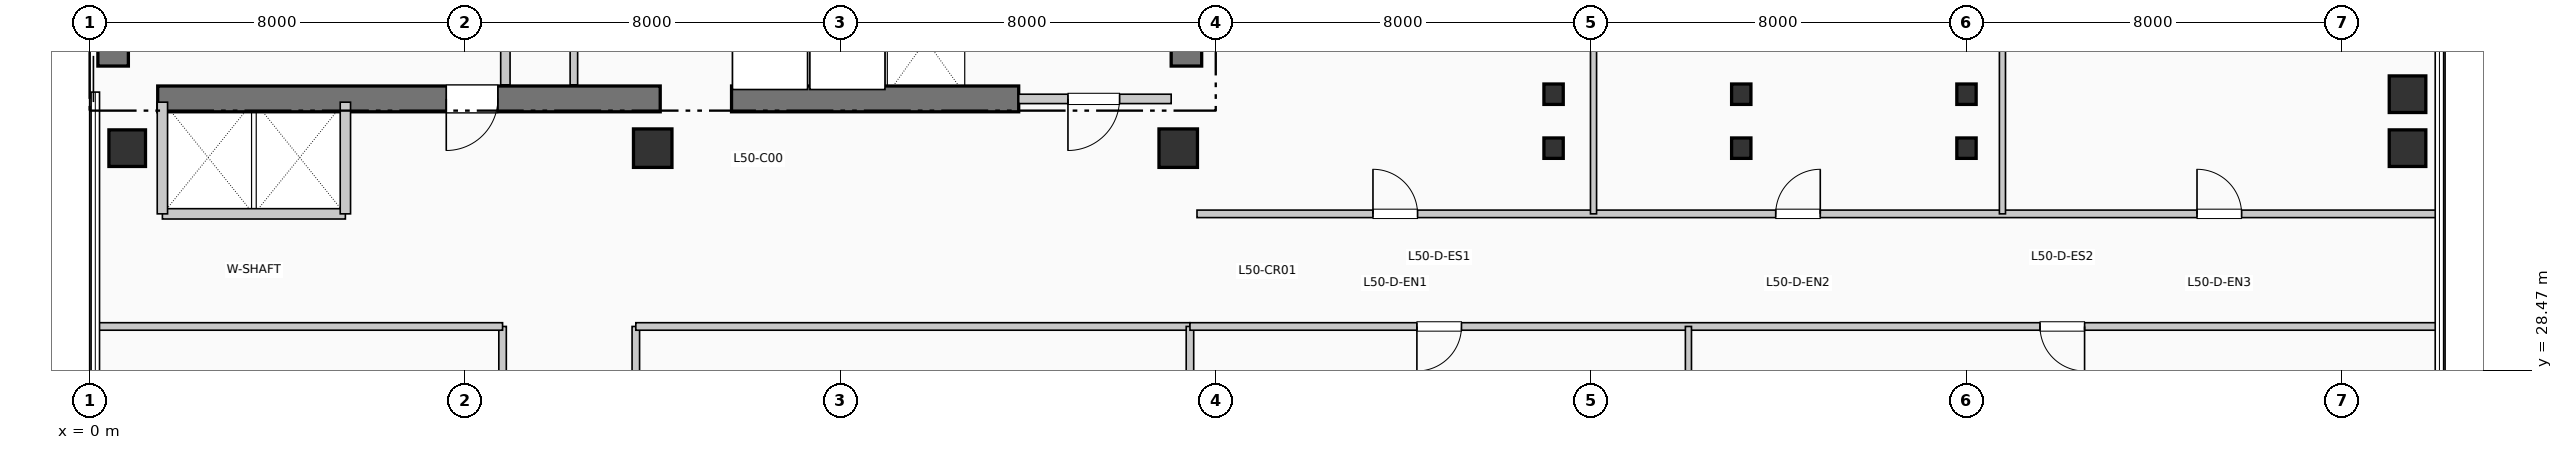
"""IFC4 building model, lengths in metres.
Left out: names, types, materials, properties, quantities, classifications, styles, units other than length and angle.
Written with IfcOpenShell. Run it as: python <this file> out.ifc"""

import sys

from ifc_helpers import new_model, si_unit, direction, frame, frame_2d, origin, origin_2d, place, context, subcontext, project, spatial, rectangle, i_section, extrude, element, fill, save


model = new_model("IFC4")
c1 = context("Model", 3, precision=1e-05, world=origin(), true_north=direction((0.0, 1.0)))
c2 = subcontext(c1, "Body", "Model", "MODEL_VIEW")
j1 = project(units=[si_unit("LENGTHUNIT", "METRE"), si_unit("PLANEANGLEUNIT", "RADIAN")], contexts=[c1])
p1 = place(None, origin())
s1 = spatial("IfcSite", under=j1, at=p1, CompositionType="ELEMENT")
p2 = place(p1, origin())
s2 = spatial("IfcBuilding", under=s1, at=p2, CompositionType="ELEMENT")
p3 = place(p2, frame((0.0, 0.0, 207.24)))
s3 = spatial("IfcBuildingStorey", under=s2, at=p3, CompositionType="ELEMENT", Elevation=207.24)
p4 = place(p3, frame((0.5, 34.95, 0.0), z_axis=(0.0, 0.0, 1.0), x_axis=(0.0, 1.0, 0.0)))
e1 = element("IfcWall", 1, at=p4, inside=s3, PredefinedType="SHEAR", context=c2, shape_type="SweptSolid", body=[
    extrude(rectangle(XDim=7.9, YDim=0.65, at=frame_2d((3.95, 0.0))), origin(), (0.0, 0.0, 1.0), 3.96),
])
p5 = place(p3, frame((23.375, 34.95, 0.0), z_axis=(0.0, 0.0, 1.0), x_axis=(0.0, 1.0, 0.0)))
e2 = element("IfcWall", 2, at=p5, inside=s3, PredefinedType="SHEAR", context=c2, shape_type="SweptSolid", body=[
    extrude(rectangle(XDim=10.64, YDim=0.65, at=frame_2d((5.32, 0.0))), origin(), (0.0, 0.0, 1.0), 3.96),
])
p6 = place(p3, frame((1.45, 34.25, 0.0), z_axis=(0.0, 0.0, 1.0), x_axis=(1.0, 0.0, 0.0)))
e3 = element("IfcWall", 3, at=p6, inside=s3, PredefinedType="SHEAR", context=c2, shape_type="SweptSolid", body=[
    extrude(rectangle(XDim=10.71, YDim=0.55, at=frame_2d((5.355, 0.0))), origin(), (0.0, 0.0, 1.0), 3.96),
])
p7 = place(p6, frame((7.25, 0.0, 0.0), z_axis=(0.0, 0.0, 1.0), x_axis=(-1.0, 0.0, 0.0)))
e4 = element("IfcOpeningElement", 4, at=p7, cuts=e3, PredefinedType="OPENING", context=c2, shape_type="SweptSolid", body=[
    extrude(rectangle(XDim=1.1, YDim=2.15, at=frame_2d((0.55, 1.075))), frame((0.0, 0.285, 0.0), z_axis=(0.0, -1.0, 0.0), x_axis=(1.0, 0.0, 0.0)), (0.0, 0.0, 1.0), 0.57),
])
p8 = place(p3, frame((13.68, 34.25, 0.0), z_axis=(0.0, 0.0, 1.0), x_axis=(1.0, 0.0, 0.0)))
e5 = element("IfcWall", 5, at=p8, inside=s3, PredefinedType="SHEAR", context=c2, shape_type="SweptSolid", body=[
    extrude(rectangle(XDim=6.12, YDim=0.55, at=frame_2d((3.06, 0.0))), origin(), (0.0, 0.0, 1.0), 3.96),
])
p9 = place(p3, frame((0.8, 33.2, 0.0), z_axis=(0.0, 0.0, 1.0), x_axis=(1.0, 0.0, 0.0)))
e6 = element("IfcColumn", 6, at=p9, inside=s3, PredefinedType="COLUMN", context=c2, shape_type="SweptSolid", body=[
    extrude(rectangle(XDim=0.78, YDim=0.78, at=origin_2d()), origin(), (0.0, 0.0, 1.0), 3.96),
])
for number, where, z_axis, x_axis in (
    (7, (12.0, 33.2, 0.0), (0.0, 0.0, 1.0), (1.0, 0.0, 0.0)),
    (8, (23.2, 33.2, 0.0), (0.0, 0.0, 1.0), (1.0, 0.0, 0.0)),
):
    element("IfcColumn", number, at=place(p3, frame(where, z_axis=z_axis, x_axis=x_axis)), inside=s3, PredefinedType="COLUMN", context=c2, shape_type="SweptSolid", body=[
        extrude(rectangle(XDim=0.82, YDim=0.82, at=origin_2d()), origin(), (0.0, 0.0, 1.0), 3.96),
    ])
for number, where, z_axis, x_axis in (
    (9, (31.2, 33.2, 0.0), (0.0, 0.0, 1.0), (1.0, 0.0, 0.0)),
    (10, (31.2, 34.35, 0.0), (0.0, 0.0, 1.0), (1.0, 0.0, 0.0)),
    (11, (35.2, 33.2, 0.0), (0.0, 0.0, 1.0), (1.0, 0.0, 0.0)),
    (12, (35.2, 34.35, 0.0), (0.0, 0.0, 1.0), (1.0, 0.0, 0.0)),
    (13, (40.0, 33.2, 0.0), (0.0, 0.0, 1.0), (1.0, 0.0, 0.0)),
    (14, (40.0, 34.35, 0.0), (0.0, 0.0, 1.0), (1.0, 0.0, 0.0)),
):
    element("IfcColumn", number, at=place(p3, frame(where, z_axis=z_axis, x_axis=x_axis)), inside=s3, PredefinedType="COLUMN", context=c2, shape_type="SweptSolid", body=[
        extrude(i_section(OverallWidth=0.412, OverallDepth=0.435, WebThickness=0.027, FlangeThickness=0.043, at=origin_2d()), origin(), (0.0, 0.0, 1.0), 3.96),
    ])
for number, where, z_axis, x_axis in (
    (15, (49.4, 33.2, 0.0), (0.0, 0.0, 1.0), (1.0, 0.0, 0.0)),
    (16, (49.4, 34.35, 0.0), (0.0, 0.0, 1.0), (1.0, 0.0, 0.0)),
):
    element("IfcColumn", number, at=place(p3, frame(where, z_axis=z_axis, x_axis=x_axis)), inside=s3, PredefinedType="COLUMN", context=c2, shape_type="SweptSolid", body=[
        extrude(rectangle(XDim=0.78, YDim=0.78, at=origin_2d()), origin(), (0.0, 0.0, 1.0), 3.96),
    ])
p10 = place(p3, frame((8.86, 34.55, 0.0), z_axis=(0.0, 0.0, 1.0), x_axis=(0.0, 1.0, 0.0)))
e17 = element("IfcWall", 17, at=p10, inside=s3, PredefinedType="PARTITIONING", context=c2, shape_type="SweptSolid", body=[
    extrude(rectangle(XDim=2.5, YDim=0.2, at=frame_2d((1.25, 0.0))), origin(), (0.0, 0.0, 1.0), 3.71),
])
p11 = place(p3, frame((19.8, 34.25, 0.0), z_axis=(0.0, 0.0, 1.0), x_axis=(1.0, 0.0, 0.0)))
e18 = element("IfcWall", 18, at=p11, inside=s3, PredefinedType="PARTITIONING", context=c2, shape_type="SweptSolid", body=[
    extrude(rectangle(XDim=3.25, YDim=0.2, at=frame_2d((1.625, 0.0))), origin(), (0.0, 0.0, 1.0), 3.71),
])
p12 = place(p11, frame((2.15, 0.0, 0.0), z_axis=(0.0, 0.0, 1.0), x_axis=(-1.0, 0.0, 0.0)))
e19 = element("IfcOpeningElement", 19, at=p12, cuts=e18, PredefinedType="OPENING", context=c2, shape_type="SweptSolid", body=[
    extrude(rectangle(XDim=1.1, YDim=2.15, at=frame_2d((0.55, 1.075))), frame((0.0, 0.11, 0.0), z_axis=(0.0, -1.0, 0.0), x_axis=(1.0, 0.0, 0.0)), (0.0, 0.0, 1.0), 0.22),
])
p13 = place(p3, frame((1.55, 31.8, 0.0), z_axis=(0.0, 0.0, 1.0), x_axis=(1.0, 0.0, 0.0)))
e20 = element("IfcWall", 20, at=p13, inside=s3, PredefinedType="PARTITIONING", context=c2, shape_type="SweptSolid", body=[
    extrude(rectangle(XDim=3.9, YDim=0.22, at=frame_2d((1.95, 0.0))), origin(), (0.0, 0.0, 1.0), 3.71),
])
for number, where, z_axis, x_axis in (
    (21, (1.55, 31.8, 0.0), (0.0, 0.0, 1.0), (0.0, 1.0, 0.0)),
    (22, (5.45, 31.8, 0.0), (0.0, 0.0, 1.0), (0.0, 1.0, 0.0)),
):
    element("IfcWall", number, at=place(p3, frame(where, z_axis=z_axis, x_axis=x_axis)), inside=s3, PredefinedType="PARTITIONING", context=c2, shape_type="SweptSolid", body=[
        extrude(rectangle(XDim=2.38, YDim=0.22, at=frame_2d((1.19, 0.0))), origin(), (0.0, 0.0, 1.0), 3.71),
    ])
p14 = place(p3, frame((10.32, 34.55, 0.0), z_axis=(0.0, 0.0, 1.0), x_axis=(0.0, 1.0, 0.0)))
e23 = element("IfcWall", 23, at=p14, inside=s3, PredefinedType="PARTITIONING", context=c2, shape_type="SweptSolid", body=[
    extrude(rectangle(XDim=2.15, YDim=0.16, at=frame_2d((1.075, 0.0))), origin(), (0.0, 0.0, 1.0), 3.71),
])
p15 = place(p3, frame((8.8, 13.2, 0.0), z_axis=(0.0, 0.0, 1.0), x_axis=(0.0, 1.0, 0.0)))
e24 = element("IfcWall", 24, at=p15, inside=s3, PredefinedType="PARTITIONING", context=c2, shape_type="SweptSolid", body=[
    extrude(rectangle(XDim=16.2, YDim=0.16, at=frame_2d((8.1, 0.0))), origin(), (0.0, 0.0, 1.0), 3.71),
])
p16 = place(p15, frame((2.581, 0.0, 0.0), z_axis=(0.0, 0.0, 1.0), x_axis=(-1.0, 0.0, 0.0)))
e25 = element("IfcOpeningElement", 25, at=p16, cuts=e24, PredefinedType="OPENING", context=c2, shape_type="SweptSolid", body=[
    extrude(rectangle(XDim=0.95, YDim=2.15, at=frame_2d((0.475, 1.075))), frame((0.0, 0.09, 0.0), z_axis=(0.0, -1.0, 0.0), x_axis=(1.0, 0.0, 0.0)), (0.0, 0.0, 1.0), 0.18),
])
p17 = place(p15, frame((7.117, 0.0, 0.0), z_axis=(0.0, 0.0, 1.0), x_axis=(-1.0, 0.0, 0.0)))
e26 = element("IfcOpeningElement", 26, at=p17, cuts=e24, PredefinedType="OPENING", context=c2, shape_type="SweptSolid", body=[
    extrude(rectangle(XDim=0.95, YDim=2.15, at=frame_2d((0.475, 1.075))), frame((0.0, 0.09, 0.0), z_axis=(0.0, -1.0, 0.0), x_axis=(1.0, 0.0, 0.0)), (0.0, 0.0, 1.0), 0.18),
])
p18 = place(p15, frame((13.111, 0.0, 0.0), z_axis=(0.0, 0.0, 1.0), x_axis=(-1.0, 0.0, 0.0)))
e27 = element("IfcOpeningElement", 27, at=p18, cuts=e24, PredefinedType="OPENING", context=c2, shape_type="SweptSolid", body=[
    extrude(rectangle(XDim=0.95, YDim=2.15, at=frame_2d((0.475, 1.075))), frame((0.0, 0.09, 0.0), z_axis=(0.0, -1.0, 0.0), x_axis=(1.0, 0.0, 0.0)), (0.0, 0.0, 1.0), 0.18),
])
p19 = place(p3, frame((11.64, 13.2, 0.0), z_axis=(0.0, 0.0, 1.0), x_axis=(0.0, 1.0, 0.0)))
e28 = element("IfcWall", 28, at=p19, inside=s3, PredefinedType="PARTITIONING", context=c2, shape_type="SweptSolid", body=[
    extrude(rectangle(XDim=16.2, YDim=0.16, at=frame_2d((8.1, 0.0))), origin(), (0.0, 0.0, 1.0), 3.095),
])
p20 = place(p19, frame((3.427, 0.0, 0.0)))
e29 = element("IfcOpeningElement", 29, at=p20, cuts=e28, PredefinedType="OPENING", context=c2, shape_type="SweptSolid", body=[
    extrude(rectangle(XDim=0.95, YDim=2.15, at=frame_2d((0.475, 1.075))), frame((0.0, 0.09, 0.0), z_axis=(0.0, -1.0, 0.0), x_axis=(1.0, 0.0, 0.0)), (0.0, 0.0, 1.0), 0.18),
])
p21 = place(p19, frame((11.027, 0.0, 0.0)))
e30 = element("IfcOpeningElement", 30, at=p21, cuts=e28, PredefinedType="OPENING", context=c2, shape_type="SweptSolid", body=[
    extrude(rectangle(XDim=0.95, YDim=2.15, at=frame_2d((0.475, 1.075))), frame((0.0, 0.09, 0.0), z_axis=(0.0, -1.0, 0.0), x_axis=(1.0, 0.0, 0.0)), (0.0, 0.0, 1.0), 0.18),
])
p22 = place(p3, frame((0.19, 29.4, 0.0), z_axis=(0.0, 0.0, 1.0), x_axis=(1.0, 0.0, 0.0)))
e31 = element("IfcWall", 31, at=p22, inside=s3, PredefinedType="PARTITIONING", context=c2, shape_type="SweptSolid", body=[
    extrude(rectangle(XDim=8.61, YDim=0.16, at=frame_2d((4.305, 0.0))), origin(), (0.0, 0.0, 1.0), 3.365),
])
p23 = place(p3, frame((11.64, 29.4, 0.0), z_axis=(0.0, 0.0, 1.0), x_axis=(1.0, 0.0, 0.0)))
e32 = element("IfcWall", 32, at=p23, inside=s3, PredefinedType="PARTITIONING", context=c2, shape_type="SweptSolid", body=[
    extrude(rectangle(XDim=11.81, YDim=0.16, at=frame_2d((5.905, 0.0))), origin(), (0.0, 0.0, 1.0), 3.365),
])
p24 = place(p3, frame((23.45, 5.99, 0.0), z_axis=(0.0, 0.0, 1.0), x_axis=(0.0, 1.0, 0.0)))
e33 = element("IfcWall", 33, at=p24, inside=s3, PredefinedType="PARTITIONING", context=c2, shape_type="SweptSolid", body=[
    extrude(rectangle(XDim=23.41, YDim=0.16, at=frame_2d((11.705, 0.0))), origin(), (0.0, 0.0, 1.0), 3.095),
])
p25 = place(p3, frame((23.45, 29.4, 0.0), z_axis=(0.0, 0.0, 1.0), x_axis=(1.0, 0.0, 0.0)))
e34 = element("IfcWall", 34, at=p25, inside=s3, PredefinedType="PARTITIONING", context=c2, shape_type="SweptSolid", body=[
    extrude(rectangle(XDim=26.56, YDim=0.16, at=frame_2d((13.28, 0.0))), origin(), (0.0, 0.0, 1.0), 3.365),
])
p26 = place(p25, frame((5.787, 0.0, 0.0), z_axis=(0.0, 0.0, 1.0), x_axis=(-1.0, 0.0, 0.0)))
e35 = element("IfcOpeningElement", 35, at=p26, cuts=e34, PredefinedType="OPENING", context=c2, shape_type="SweptSolid", body=[
    extrude(rectangle(XDim=0.95, YDim=2.15, at=frame_2d((0.475, 1.075))), frame((0.0, 0.09, 0.0), z_axis=(0.0, -1.0, 0.0), x_axis=(1.0, 0.0, 0.0)), (0.0, 0.0, 1.0), 0.18),
])
p27 = place(p25, frame((19.067, 0.0, 0.0), z_axis=(0.0, 0.0, 1.0), x_axis=(-1.0, 0.0, 0.0)))
e36 = element("IfcOpeningElement", 36, at=p27, cuts=e34, PredefinedType="OPENING", context=c2, shape_type="SweptSolid", body=[
    extrude(rectangle(XDim=0.95, YDim=2.15, at=frame_2d((0.475, 1.075))), frame((0.0, 0.09, 0.0), z_axis=(0.0, -1.0, 0.0), x_axis=(1.0, 0.0, 0.0)), (0.0, 0.0, 1.0), 0.18),
])
p28 = place(p3, frame((23.6, 31.8, 0.0), z_axis=(0.0, 0.0, 1.0), x_axis=(1.0, 0.0, 0.0)))
e37 = element("IfcWall", 37, at=p28, inside=s3, PredefinedType="PARTITIONING", context=c2, shape_type="SweptSolid", body=[
    extrude(rectangle(XDim=26.41, YDim=0.16, at=frame_2d((13.205, 0.0))), origin(), (0.0, 0.0, 1.0), 3.71),
])
p29 = place(p28, frame((3.75, 0.0, 0.0)))
e38 = element("IfcOpeningElement", 38, at=p29, cuts=e37, PredefinedType="OPENING", context=c2, shape_type="SweptSolid", body=[
    extrude(rectangle(XDim=0.95, YDim=2.15, at=frame_2d((0.475, 1.075))), frame((0.0, 0.09, 0.0), z_axis=(0.0, -1.0, 0.0), x_axis=(1.0, 0.0, 0.0)), (0.0, 0.0, 1.0), 0.18),
])
p30 = place(p28, frame((12.334, 0.0, 0.0)))
e39 = element("IfcOpeningElement", 39, at=p30, cuts=e37, PredefinedType="OPENING", context=c2, shape_type="SweptSolid", body=[
    extrude(rectangle(XDim=0.95, YDim=2.15, at=frame_2d((0.475, 1.075))), frame((0.0, 0.09, 0.0), z_axis=(0.0, -1.0, 0.0), x_axis=(1.0, 0.0, 0.0)), (0.0, 0.0, 1.0), 0.18),
])
p31 = place(p28, frame((21.313, 0.0, 0.0)))
e40 = element("IfcOpeningElement", 40, at=p31, cuts=e37, PredefinedType="OPENING", context=c2, shape_type="SweptSolid", body=[
    extrude(rectangle(XDim=0.95, YDim=2.15, at=frame_2d((0.475, 1.075))), frame((0.0, 0.09, 0.0), z_axis=(0.0, -1.0, 0.0), x_axis=(1.0, 0.0, 0.0)), (0.0, 0.0, 1.0), 0.18),
])
p32 = place(p3, frame((34.074, 22.19, 0.0), z_axis=(0.0, 0.0, 1.0), x_axis=(0.0, 1.0, 0.0)))
e41 = element("IfcWall", 41, at=p32, inside=s3, PredefinedType="PARTITIONING", context=c2, shape_type="SweptSolid", body=[
    extrude(rectangle(XDim=7.21, YDim=0.13, at=frame_2d((3.605, 0.0))), origin(), (0.0, 0.0, 1.0), 3.71),
])
for number, where, z_axis, x_axis in (
    (42, (32.051, 31.8, 0.0), (0.0, 0.0, 1.0), (0.0, 1.0, 0.0)),
    (43, (40.767, 31.8, 0.0), (0.0, 0.0, 1.0), (0.0, 1.0, 0.0)),
):
    element("IfcWall", number, at=place(p3, frame(where, z_axis=z_axis, x_axis=x_axis)), inside=s3, PredefinedType="PARTITIONING", context=c2, shape_type="SweptSolid", body=[
        extrude(rectangle(XDim=14.01, YDim=0.13, at=frame_2d((7.005, 0.0))), origin(), (0.0, 0.0, 1.0), 3.71),
    ])
p33 = place(p7, origin())
e44 = element("IfcDoor", 44, at=p33, inside=s3, OperationType="SINGLE_SWING_LEFT", PredefinedType="DOOR", context=c2, shape_type="SweptSolid", body=[
    extrude(rectangle(XDim=1.1, YDim=2.15, at=frame_2d((0.55, 1.075))), frame((0.0, 0.025, 0.0), z_axis=(0.0, -1.0, 0.0), x_axis=(1.0, 0.0, 0.0)), (0.0, 0.0, 1.0), 0.05),
])
fill(e4, e44)
p34 = place(p12, origin())
e45 = element("IfcDoor", 45, at=p34, inside=s3, OperationType="SINGLE_SWING_LEFT", PredefinedType="DOOR", context=c2, shape_type="SweptSolid", body=[
    extrude(rectangle(XDim=1.1, YDim=2.15, at=frame_2d((0.55, 1.075))), frame((0.0, 0.025, 0.0), z_axis=(0.0, -1.0, 0.0), x_axis=(1.0, 0.0, 0.0)), (0.0, 0.0, 1.0), 0.05),
])
fill(e19, e45)
p35 = place(p26, origin())
e46 = element("IfcDoor", 46, at=p35, inside=s3, OperationType="SINGLE_SWING_LEFT", PredefinedType="DOOR", context=c2, shape_type="SweptSolid", body=[
    extrude(rectangle(XDim=0.95, YDim=2.15, at=frame_2d((0.475, 1.075))), frame((0.0, 0.025, 0.0), z_axis=(0.0, -1.0, 0.0), x_axis=(1.0, 0.0, 0.0)), (0.0, 0.0, 1.0), 0.05),
])
fill(e35, e46)
p36 = place(p27, origin())
e47 = element("IfcDoor", 47, at=p36, inside=s3, OperationType="SINGLE_SWING_RIGHT", PredefinedType="DOOR", context=c2, shape_type="SweptSolid", body=[
    extrude(rectangle(XDim=0.95, YDim=2.15, at=frame_2d((0.475, 1.075))), frame((0.0, 0.025, 0.0), z_axis=(0.0, -1.0, 0.0), x_axis=(1.0, 0.0, 0.0)), (0.0, 0.0, 1.0), 0.05),
])
fill(e36, e47)
p37 = place(p29, origin())
e48 = element("IfcDoor", 48, at=p37, inside=s3, OperationType="SINGLE_SWING_LEFT", PredefinedType="DOOR", context=c2, shape_type="SweptSolid", body=[
    extrude(rectangle(XDim=0.95, YDim=2.15, at=frame_2d((0.475, 1.075))), frame((0.0, 0.025, 0.0), z_axis=(0.0, -1.0, 0.0), x_axis=(1.0, 0.0, 0.0)), (0.0, 0.0, 1.0), 0.05),
])
fill(e38, e48)
p38 = place(p30, origin())
e49 = element("IfcDoor", 49, at=p38, inside=s3, OperationType="SINGLE_SWING_RIGHT", PredefinedType="DOOR", context=c2, shape_type="SweptSolid", body=[
    extrude(rectangle(XDim=0.95, YDim=2.15, at=frame_2d((0.475, 1.075))), frame((0.0, 0.025, 0.0), z_axis=(0.0, -1.0, 0.0), x_axis=(1.0, 0.0, 0.0)), (0.0, 0.0, 1.0), 0.05),
])
fill(e39, e49)
p39 = place(p31, origin())
e50 = element("IfcDoor", 50, at=p39, inside=s3, OperationType="SINGLE_SWING_LEFT", PredefinedType="DOOR", context=c2, shape_type="SweptSolid", body=[
    extrude(rectangle(XDim=0.95, YDim=2.15, at=frame_2d((0.475, 1.075))), frame((0.0, 0.025, 0.0), z_axis=(0.0, -1.0, 0.0), x_axis=(1.0, 0.0, 0.0)), (0.0, 0.0, 1.0), 0.05),
])
fill(e40, e50)
save(model, sys.argv[1])
